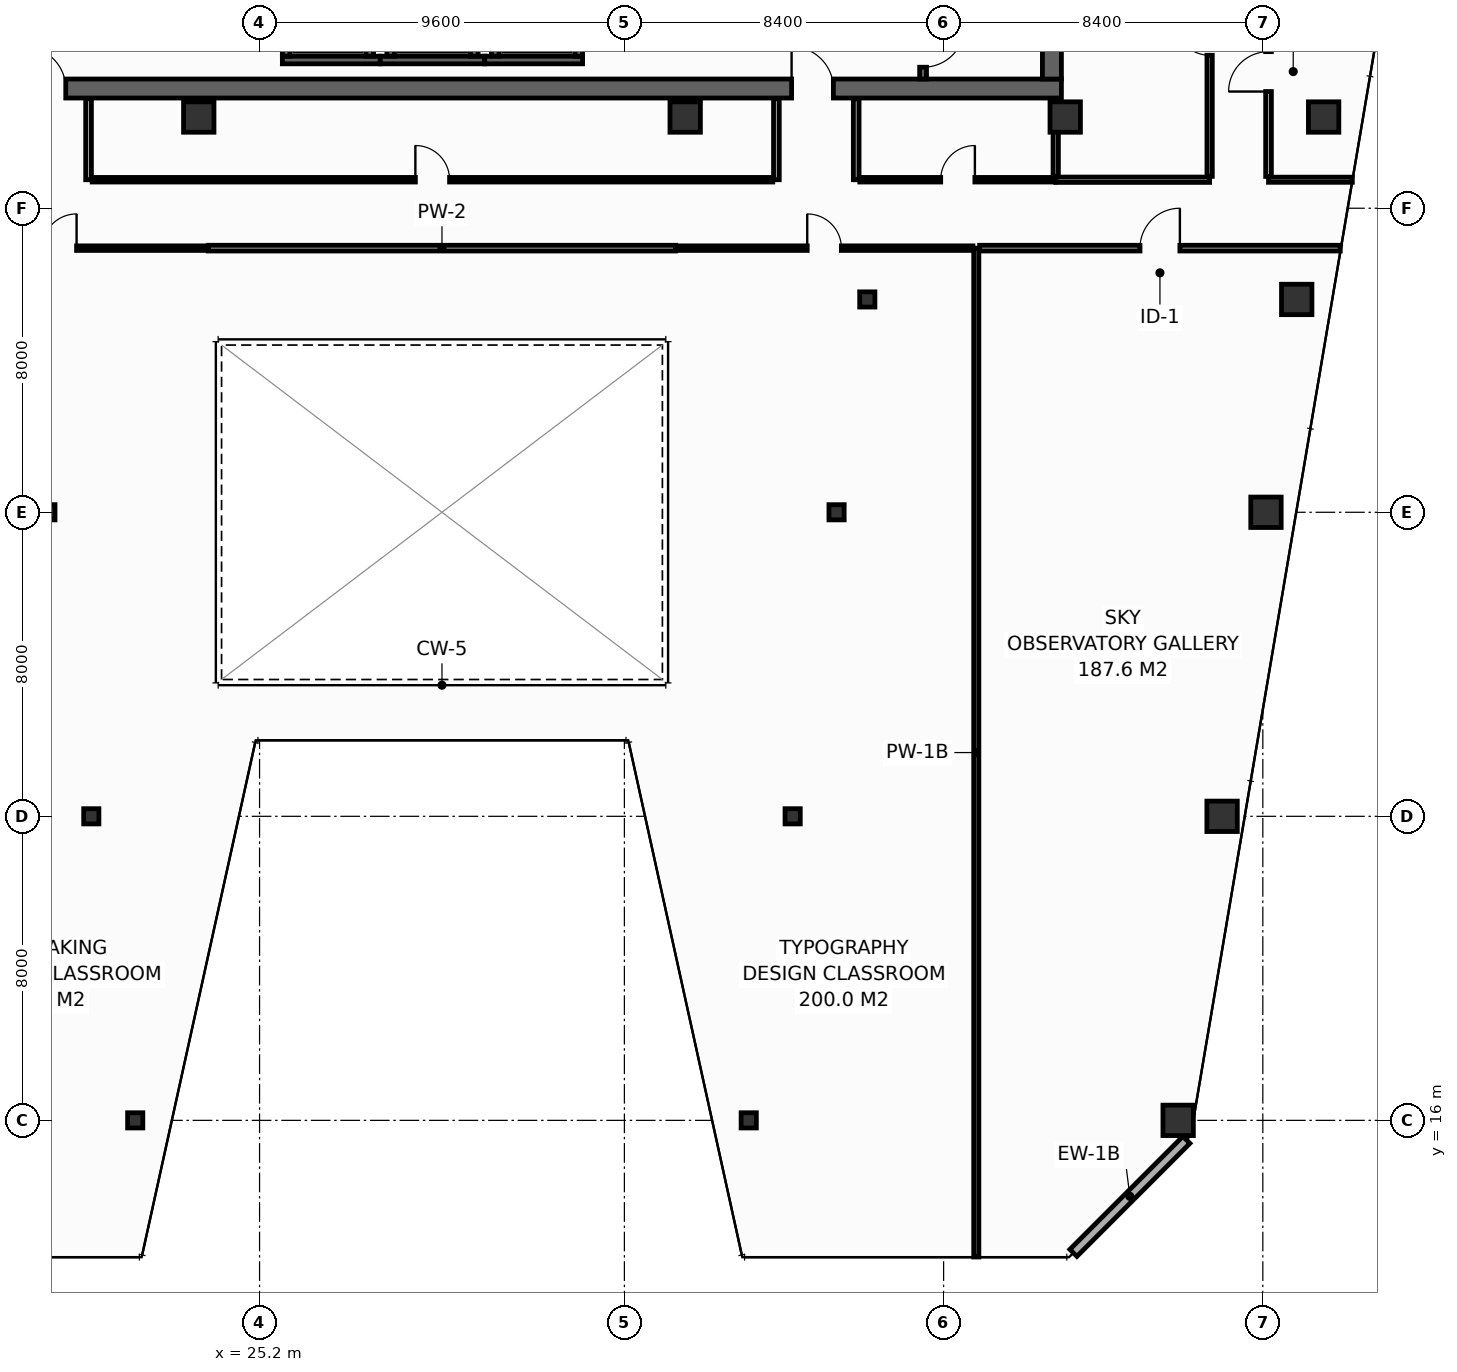
"""IFC4 building model, lengths in metres.
Left out: names, types, materials, properties, quantities, classifications, styles, units other than length and angle.
Written with IfcOpenShell. Run it as: python <this file> out.ifc"""

import sys

from ifc_helpers import new_model, si_unit, direction, frame, frame_2d, origin, origin_2d, place, context, subcontext, project, spatial, rectangle, hollow_rectangle, extrude, element, fill, save


model = new_model("IFC4")
c1 = context("Model", 3, precision=1e-05, world=origin(), true_north=direction((0.0, 1.0)))
c2 = subcontext(c1, "Body", "Model", "MODEL_VIEW")
j1 = project(units=[si_unit("LENGTHUNIT", "METRE"), si_unit("PLANEANGLEUNIT", "RADIAN")], contexts=[c1])
p1 = place(None, origin())
s1 = spatial("IfcSite", under=j1, at=p1, CompositionType="ELEMENT")
p2 = place(p1, origin())
s2 = spatial("IfcBuilding", under=s1, at=p2, CompositionType="ELEMENT")
p3 = place(p2, frame((0.0, 0.0, 217.0)))
s3 = spatial("IfcBuildingStorey", under=s2, at=p3, CompositionType="ELEMENT", Elevation=217.0)
p4 = place(p3, frame((13.6, 43.15, 0.0), z_axis=(0.0, 0.0, 1.0), x_axis=(1.0, 0.0, 0.0)))
e1 = element("IfcWall", 1, at=p4, inside=s3, PredefinedType="SHEAR", context=c2, shape_type="SweptSolid", body=[
    extrude(rectangle(XDim=32.7, YDim=0.5, at=frame_2d((16.35, 0.0))), origin(), (0.0, 0.0, 1.0), 3.55),
])
p5 = place(p4, frame((5.4, 0.0, 0.0)))
e2 = element("IfcOpeningElement", 2, at=p5, cuts=e1, PredefinedType="OPENING", context=c2, shape_type="SweptSolid", body=[
    extrude(rectangle(XDim=1.1, YDim=2.15, at=frame_2d((0.55, 1.075))), frame((0.0, 0.26, 0.0), z_axis=(0.0, -1.0, 0.0), x_axis=(1.0, 0.0, 0.0)), (0.0, 0.0, 1.0), 0.52),
])
p6 = place(p4, frame((25.6, 0.0, 0.0)))
e3 = element("IfcOpeningElement", 3, at=p6, cuts=e1, PredefinedType="OPENING", context=c2, shape_type="SweptSolid", body=[
    extrude(rectangle(XDim=1.1, YDim=2.15, at=frame_2d((0.55, 1.075))), frame((0.0, 0.26, 0.0), z_axis=(0.0, -1.0, 0.0), x_axis=(1.0, 0.0, 0.0)), (0.0, 0.0, 1.0), 0.52),
])
p7 = place(p3, frame((46.05, 43.4, 0.0), z_axis=(0.0, 0.0, 1.0), x_axis=(0.0, 1.0, 0.0)))
e4 = element("IfcWall", 4, at=p7, inside=s3, PredefinedType="SHEAR", context=c2, shape_type="SweptSolid", body=[
    extrude(rectangle(XDim=10.4, YDim=0.5, at=frame_2d((5.2, 0.0))), origin(), (0.0, 0.0, 1.0), 3.55),
])
for number, where, z_axis, x_axis in (
    (5, (23.6, 42.4, 0.0), (0.0, 0.0, 1.0), (1.0, 0.0, 0.0)),
    (6, (36.4, 42.4, 0.0), (0.0, 0.0, 1.0), (1.0, 0.0, 0.0)),
    (7, (46.4, 42.4, 0.0), (0.0, 0.0, 1.0), (1.0, 0.0, 0.0)),
    (8, (53.2, 42.4, 0.0), (0.0, 0.0, 1.0), (1.0, 0.0, 0.0)),
    (9, (49.372, 16.0, 0.0), (0.0, 0.0, 1.0), (1.0, 0.0, 0.0)),
):
    element("IfcColumn", number, at=place(p3, frame(where, z_axis=z_axis, x_axis=x_axis)), inside=s3, PredefinedType="COLUMN", context=c2, shape_type="SweptSolid", body=[
        extrude(hollow_rectangle(XDim=0.8, YDim=0.8, WallThickness=0.036, at=origin_2d()), origin(), (0.0, 0.0, 1.0), 3.8),
    ])
for number, where, z_axis, x_axis in (
    (10, (21.928, 16.0, 0.0), (0.0, 0.0, 1.0), (1.0, 0.0, 0.0)),
    (11, (38.072, 16.0, 0.0), (0.0, 0.0, 1.0), (1.0, 0.0, 0.0)),
):
    element("IfcColumn", number, at=place(p3, frame(where, z_axis=z_axis, x_axis=x_axis)), inside=s3, PredefinedType="COLUMN", context=c2, shape_type="SweptSolid", body=[
        extrude(hollow_rectangle(XDim=0.4, YDim=0.4, WallThickness=0.016, at=origin_2d()), origin(), (0.0, 0.0, 1.0), 3.8),
    ])
p8 = place(p3, frame((50.528, 24.0, 0.0), z_axis=(0.0, 0.0, 1.0), x_axis=(1.0, 0.0, 0.0)))
e12 = element("IfcColumn", 12, at=p8, inside=s3, PredefinedType="COLUMN", context=c2, shape_type="SweptSolid", body=[
    extrude(hollow_rectangle(XDim=0.8, YDim=0.8, WallThickness=0.036, at=origin_2d()), origin(), (0.0, 0.0, 1.0), 3.8),
])
for number, where, z_axis, x_axis in (
    (13, (20.772, 24.0, 0.0), (0.0, 0.0, 1.0), (1.0, 0.0, 0.0)),
    (14, (39.228, 24.0, 0.0), (0.0, 0.0, 1.0), (1.0, 0.0, 0.0)),
):
    element("IfcColumn", number, at=place(p3, frame(where, z_axis=z_axis, x_axis=x_axis)), inside=s3, PredefinedType="COLUMN", context=c2, shape_type="SweptSolid", body=[
        extrude(hollow_rectangle(XDim=0.4, YDim=0.4, WallThickness=0.016, at=origin_2d()), origin(), (0.0, 0.0, 1.0), 3.8),
    ])
p9 = place(p3, frame((51.683, 32.0, 0.0), z_axis=(0.0, 0.0, 1.0), x_axis=(1.0, 0.0, 0.0)))
e15 = element("IfcColumn", 15, at=p9, inside=s3, PredefinedType="COLUMN", context=c2, shape_type="SweptSolid", body=[
    extrude(hollow_rectangle(XDim=0.8, YDim=0.8, WallThickness=0.036, at=origin_2d()), origin(), (0.0, 0.0, 1.0), 3.8),
])
for number, where, z_axis, x_axis in (
    (16, (19.617, 32.0, 0.0), (0.0, 0.0, 1.0), (1.0, 0.0, 0.0)),
    (17, (40.383, 32.0, 0.0), (0.0, 0.0, 1.0), (1.0, 0.0, 0.0)),
):
    element("IfcColumn", number, at=place(p3, frame(where, z_axis=z_axis, x_axis=x_axis)), inside=s3, PredefinedType="COLUMN", context=c2, shape_type="SweptSolid", body=[
        extrude(hollow_rectangle(XDim=0.4, YDim=0.4, WallThickness=0.016, at=origin_2d()), origin(), (0.0, 0.0, 1.0), 3.8),
    ])
p10 = place(p3, frame((52.492, 37.6, 0.0), z_axis=(0.0, 0.0, 1.0), x_axis=(1.0, 0.0, 0.0)))
e18 = element("IfcColumn", 18, at=p10, inside=s3, PredefinedType="COLUMN", context=c2, shape_type="SweptSolid", body=[
    extrude(hollow_rectangle(XDim=0.8, YDim=0.8, WallThickness=0.036, at=origin_2d()), origin(), (0.0, 0.0, 1.0), 3.8),
])
p11 = place(p3, frame((41.192, 37.6, 0.0), z_axis=(0.0, 0.0, 1.0), x_axis=(1.0, 0.0, 0.0)))
e19 = element("IfcColumn", 19, at=p11, inside=s3, PredefinedType="COLUMN", context=c2, shape_type="SweptSolid", body=[
    extrude(hollow_rectangle(XDim=0.4, YDim=0.4, WallThickness=0.016, at=origin_2d()), origin(), (0.0, 0.0, 1.0), 3.8),
])
p12 = place(p3, frame((25.8, 43.9, 0.0), z_axis=(0.0, 0.0, 1.0), x_axis=(1.0, 0.0, 0.0)))
e20 = element("IfcWall", 20, at=p12, inside=s3, PredefinedType="SHEAR", context=c2, shape_type="SweptSolid", body=[
    extrude(rectangle(XDim=2.575, YDim=0.2, at=frame_2d((1.288, 0.0))), origin(), (0.0, 0.0, 1.0), 3.55),
])
for number, where, z_axis, x_axis in (
    (21, (25.9, 44.0, 0.0), (0.0, 0.0, 1.0), (0.0, 1.0, 0.0)),
    (22, (28.1, 44.0, 0.0), (0.0, 0.0, 1.0), (0.0, 1.0, 0.0)),
):
    element("IfcWall", number, at=place(p3, frame(where, z_axis=z_axis, x_axis=x_axis)), inside=s3, PredefinedType="SHEAR", context=c2, shape_type="SweptSolid", body=[
        extrude(rectangle(XDim=2.3, YDim=0.2, at=frame_2d((1.15, 0.0))), origin(), (0.0, 0.0, 1.0), 3.55),
    ])
p13 = place(p3, frame((28.375, 43.9, 0.0), z_axis=(0.0, 0.0, 1.0), x_axis=(1.0, 0.0, 0.0)))
e23 = element("IfcWall", 23, at=p13, inside=s3, PredefinedType="SHEAR", context=c2, shape_type="SweptSolid", body=[
    extrude(rectangle(XDim=2.75, YDim=0.2, at=frame_2d((1.375, 0.0))), origin(), (0.0, 0.0, 1.0), 3.55),
])
for number, where, z_axis, x_axis in (
    (24, (28.65, 44.0, 0.0), (0.0, 0.0, 1.0), (0.0, 1.0, 0.0)),
    (25, (30.85, 44.0, 0.0), (0.0, 0.0, 1.0), (0.0, 1.0, 0.0)),
):
    element("IfcWall", number, at=place(p3, frame(where, z_axis=z_axis, x_axis=x_axis)), inside=s3, PredefinedType="SHEAR", context=c2, shape_type="SweptSolid", body=[
        extrude(rectangle(XDim=2.3, YDim=0.2, at=frame_2d((1.15, 0.0))), origin(), (0.0, 0.0, 1.0), 3.55),
    ])
p14 = place(p3, frame((31.125, 43.9, 0.0), z_axis=(0.0, 0.0, 1.0), x_axis=(1.0, 0.0, 0.0)))
e26 = element("IfcWall", 26, at=p14, inside=s3, PredefinedType="SHEAR", context=c2, shape_type="SweptSolid", body=[
    extrude(rectangle(XDim=2.575, YDim=0.2, at=frame_2d((1.288, 0.0))), origin(), (0.0, 0.0, 1.0), 3.55),
])
for number, where, z_axis, x_axis in (
    (27, (31.4, 44.0, 0.0), (0.0, 0.0, 1.0), (0.0, 1.0, 0.0)),
    (28, (33.6, 44.0, 0.0), (0.0, 0.0, 1.0), (0.0, 1.0, 0.0)),
):
    element("IfcWall", number, at=place(p3, frame(where, z_axis=z_axis, x_axis=x_axis)), inside=s3, PredefinedType="SHEAR", context=c2, shape_type="SweptSolid", body=[
        extrude(rectangle(XDim=2.3, YDim=0.2, at=frame_2d((1.15, 0.0))), origin(), (0.0, 0.0, 1.0), 3.55),
    ])
p15 = place(p3, frame((42.66, 53.8, 0.0), z_axis=(0.0, 0.0, 1.0), x_axis=(0.0, -1.0, 0.0)))
e29 = element("IfcWall", 29, at=p15, inside=s3, PredefinedType="SHEAR", context=c2, shape_type="SweptSolid", body=[
    extrude(rectangle(XDim=10.4, YDim=0.18, at=frame_2d((5.2, 0.0))), origin(), (0.0, 0.0, 1.0), 3.55),
])
p16 = place(p15, frame((8.99, 0.0, 0.0)))
e30 = element("IfcOpeningElement", 30, at=p16, cuts=e29, PredefinedType="OPENING", context=c2, shape_type="SweptSolid", body=[
    extrude(rectangle(XDim=1.1, YDim=2.15, at=frame_2d((0.55, 1.075))), frame((0.0, 0.1, 0.0), z_axis=(0.0, -1.0, 0.0), x_axis=(1.0, 0.0, 0.0)), (0.0, 0.0, 1.0), 0.2),
])
p17 = place(p3, frame((46.615, 12.513, 0.0), z_axis=(0.0, 0.0, 1.0), x_axis=(0.707135806771, 0.70707775441, 0.0)))
e31 = element("IfcWall", 31, at=p17, inside=s3, PredefinedType="STANDARD", context=c2, shape_type="SweptSolid", body=[
    extrude(rectangle(XDim=4.206, YDim=0.26, at=frame_2d((2.103, 0.0))), origin(), (0.0, 0.0, 1.0), 3.55),
])
p18 = place(p3, frame((46.15, 40.75, 0.0), z_axis=(0.0, 0.0, 1.0), x_axis=(1.0, 0.0, 0.0)))
e32 = element("IfcWall", 32, at=p18, inside=s3, PredefinedType="PARTITIONING", context=c2, shape_type="SweptSolid", body=[
    extrude(rectangle(XDim=4.05, YDim=0.14, at=frame_2d((2.025, 0.0))), origin(), (0.0, 0.0, 1.0), 3.55),
])
p19 = place(p3, frame((46.15, 40.84, 0.0), z_axis=(0.0, 0.0, 1.0), x_axis=(0.0, 1.0, 0.0)))
e33 = element("IfcWall", 33, at=p19, inside=s3, PredefinedType="PARTITIONING", context=c2, shape_type="SweptSolid", body=[
    extrude(rectangle(XDim=2.04, YDim=0.14, at=frame_2d((1.02, 0.0))), origin(), (0.0, 0.0, 1.0), 3.55),
])
p20 = place(p3, frame((50.2, 40.84, 0.0), z_axis=(0.0, 0.0, 1.0), x_axis=(0.0, 1.0, 0.0)))
e34 = element("IfcWall", 34, at=p20, inside=s3, PredefinedType="PARTITIONING", context=c2, shape_type="SweptSolid", body=[
    extrude(rectangle(XDim=7.27, YDim=0.14, at=frame_2d((3.635, 0.0))), origin(), (0.0, 0.0, 1.0), 2.835),
])
p21 = place(p20, frame((3.185, 0.0, 0.0)))
e35 = element("IfcOpeningElement", 35, at=p21, cuts=e34, PredefinedType="OPENING", context=c2, shape_type="SweptSolid", body=[
    extrude(rectangle(XDim=0.9, YDim=2.1, at=frame_2d((0.45, 1.05))), frame((0.0, 0.08, 0.0), z_axis=(0.0, -1.0, 0.0), x_axis=(1.0, 0.0, 0.0)), (0.0, 0.0, 1.0), 0.16),
])
p22 = place(p3, frame((51.75, 40.75, 0.0), z_axis=(0.0, 0.0, 1.0), x_axis=(1.0, 0.0, 0.0)))
e36 = element("IfcWall", 36, at=p22, inside=s3, PredefinedType="PARTITIONING", context=c2, shape_type="SweptSolid", body=[
    extrude(rectangle(XDim=2.205, YDim=0.135, at=frame_2d((1.103, 0.0))), origin(), (0.0, 0.0, 1.0), 3.035),
])
p23 = place(p3, frame((51.75, 40.837, 0.0), z_axis=(0.0, 0.0, 1.0), x_axis=(0.0, 1.0, 0.0)))
e37 = element("IfcWall", 37, at=p23, inside=s3, PredefinedType="PARTITIONING", context=c2, shape_type="SweptSolid", body=[
    extrude(rectangle(XDim=5.075, YDim=0.15, at=frame_2d((2.538, 0.0))), origin(), (0.0, 0.0, 1.0), 2.835),
])
p24 = place(p23, frame((2.233, 0.0, 0.0)))
e38 = element("IfcOpeningElement", 38, at=p24, cuts=e37, PredefinedType="OPENING", context=c2, shape_type="SweptSolid", body=[
    extrude(rectangle(XDim=1.05, YDim=2.15, at=frame_2d((0.525, 1.075))), frame((0.0, 0.085, 0.0), z_axis=(0.0, -1.0, 0.0), x_axis=(1.0, 0.0, 0.0)), (0.0, 0.0, 1.0), 0.17),
])
for number, where, z_axis, x_axis in (
    (39, (20.7, 40.75, 0.0), (0.0, 0.0, 1.0), (0.0, 1.0, 0.0)),
    (40, (38.8, 40.75, 0.0), (0.0, 0.0, 1.0), (0.0, 1.0, 0.0)),
    (41, (40.9, 40.75, 0.0), (0.0, 0.0, 1.0), (0.0, 1.0, 0.0)),
):
    element("IfcWall", number, at=place(p3, frame(where, z_axis=z_axis, x_axis=x_axis)), inside=s3, PredefinedType="PARTITIONING", context=c2, shape_type="SweptSolid", body=[
        extrude(rectangle(XDim=2.13, YDim=0.15, at=frame_2d((1.065, 0.0))), origin(), (0.0, 0.0, 1.0), 3.55),
    ])
p25 = place(p3, frame((20.795, 40.75, 0.0), z_axis=(0.0, 0.0, 1.0), x_axis=(1.0, 0.0, 0.0)))
e42 = element("IfcWall", 42, at=p25, inside=s3, PredefinedType="PARTITIONING", context=c2, shape_type="SweptSolid", body=[
    extrude(rectangle(XDim=17.91, YDim=0.12, at=frame_2d((8.955, 0.0))), origin(), (0.0, 0.0, 1.0), 2.835),
])
p26 = place(p25, frame((8.505, 0.0, 0.0)))
e43 = element("IfcOpeningElement", 43, at=p26, cuts=e42, PredefinedType="OPENING", context=c2, shape_type="SweptSolid", body=[
    extrude(rectangle(XDim=0.9, YDim=2.1, at=frame_2d((0.45, 1.05))), frame((0.0, 0.07, 0.0), z_axis=(0.0, -1.0, 0.0), x_axis=(1.0, 0.0, 0.0)), (0.0, 0.0, 1.0), 0.14),
])
p27 = place(p3, frame((40.995, 40.75, 0.0), z_axis=(0.0, 0.0, 1.0), x_axis=(1.0, 0.0, 0.0)))
e44 = element("IfcWall", 44, at=p27, inside=s3, PredefinedType="PARTITIONING", context=c2, shape_type="SweptSolid", body=[
    extrude(rectangle(XDim=5.155, YDim=0.12, at=frame_2d((2.577, 0.0))), origin(), (0.0, 0.0, 1.0), 3.55),
])
p28 = place(p27, frame((2.128, 0.0, 0.0)))
e45 = element("IfcOpeningElement", 45, at=p28, cuts=e44, PredefinedType="OPENING", context=c2, shape_type="SweptSolid", body=[
    extrude(rectangle(XDim=0.9, YDim=2.1, at=frame_2d((0.45, 1.05))), frame((0.0, 0.07, 0.0), z_axis=(0.0, -1.0, 0.0), x_axis=(1.0, 0.0, 0.0)), (0.0, 0.0, 1.0), 0.14),
])
p29 = place(p3, frame((44.06, 12.405, 0.0), z_axis=(0.0, 0.0, 1.0), x_axis=(0.0, 1.0, 0.0)))
e46 = element("IfcWall", 46, at=p29, inside=s3, PredefinedType="PARTITIONING", context=c2, shape_type="SweptSolid", body=[
    extrude(rectangle(XDim=26.545, YDim=0.135, at=frame_2d((13.272, 0.0))), origin(), (0.0, 0.0, 1.0), 2.835),
])
p30 = place(p3, frame((16.02, 38.95, 0.0), z_axis=(0.0, 0.0, 1.0), x_axis=(1.0, 0.0, 0.0)))
e47 = element("IfcWall", 47, at=p30, inside=s3, PredefinedType="PARTITIONING", context=c2, shape_type="SweptSolid", body=[
    extrude(rectangle(XDim=7.83, YDim=0.12, at=frame_2d((3.915, 0.0))), origin(), (0.0, 0.0, 1.0), 2.835),
])
p31 = place(p30, frame((3.465, 0.0, 0.0)))
e48 = element("IfcOpeningElement", 48, at=p31, cuts=e47, PredefinedType="OPENING", context=c2, shape_type="SweptSolid", body=[
    extrude(rectangle(XDim=0.9, YDim=2.1, at=frame_2d((0.45, 1.05))), frame((0.0, 0.07, 0.0), z_axis=(0.0, -1.0, 0.0), x_axis=(1.0, 0.0, 0.0)), (0.0, 0.0, 1.0), 0.14),
])
p32 = place(p3, frame((23.85, 38.95, 0.0), z_axis=(0.0, 0.0, 1.0), x_axis=(1.0, 0.0, 0.0)))
e49 = element("IfcWall", 49, at=p32, inside=s3, PredefinedType="PARTITIONING", context=c2, shape_type="SweptSolid", body=[
    extrude(rectangle(XDim=12.3, YDim=0.15, at=frame_2d((6.15, 0.0))), origin(), (0.0, 0.0, 1.0), 3.55),
])
p33 = place(p3, frame((36.15, 38.95, 0.0), z_axis=(0.0, 0.0, 1.0), x_axis=(1.0, 0.0, 0.0)))
e50 = element("IfcWall", 50, at=p33, inside=s3, PredefinedType="PARTITIONING", context=c2, shape_type="SweptSolid", body=[
    extrude(rectangle(XDim=7.823, YDim=0.12, at=frame_2d((3.911, 0.0))), origin(), (0.0, 0.0, 1.0), 2.835),
])
p34 = place(p33, frame((3.461, 0.0, 0.0)))
e51 = element("IfcOpeningElement", 51, at=p34, cuts=e50, PredefinedType="OPENING", context=c2, shape_type="SweptSolid", body=[
    extrude(rectangle(XDim=0.9, YDim=2.1, at=frame_2d((0.45, 1.05))), frame((0.0, 0.07, 0.0), z_axis=(0.0, -1.0, 0.0), x_axis=(1.0, 0.0, 0.0)), (0.0, 0.0, 1.0), 0.14),
])
p35 = place(p3, frame((44.147, 38.95, 0.0), z_axis=(0.0, 0.0, 1.0), x_axis=(1.0, 0.0, 0.0)))
e52 = element("IfcWall", 52, at=p35, inside=s3, PredefinedType="PARTITIONING", context=c2, shape_type="SweptSolid", body=[
    extrude(rectangle(XDim=9.49, YDim=0.15, at=frame_2d((4.745, 0.0))), origin(), (0.0, 0.0, 1.0), 3.035),
])
p36 = place(p35, frame((4.22, 0.0, 0.0)))
e53 = element("IfcOpeningElement", 53, at=p36, cuts=e52, PredefinedType="OPENING", context=c2, shape_type="SweptSolid", body=[
    extrude(rectangle(XDim=1.05, YDim=2.15, at=frame_2d((0.525, 1.075))), frame((0.0, 0.085, 0.0), z_axis=(0.0, -1.0, 0.0), x_axis=(1.0, 0.0, 0.0)), (0.0, 0.0, 1.0), 0.17),
])
p37 = place(p16, origin())
e54 = element("IfcDoor", 54, at=p37, inside=s3, OperationType="SINGLE_SWING_LEFT", PredefinedType="DOOR", context=c2, shape_type="SweptSolid", body=[
    extrude(rectangle(XDim=1.1, YDim=2.15, at=frame_2d((0.55, 1.075))), frame((0.0, 0.025, 0.0), z_axis=(0.0, -1.0, 0.0), x_axis=(1.0, 0.0, 0.0)), (0.0, 0.0, 1.0), 0.05),
])
fill(e30, e54)
p38 = place(p5, origin())
e55 = element("IfcDoor", 55, at=p38, inside=s3, OperationType="SINGLE_SWING_LEFT", PredefinedType="DOOR", context=c2, shape_type="SweptSolid", body=[
    extrude(rectangle(XDim=1.1, YDim=2.15, at=frame_2d((0.55, 1.075))), frame((0.0, 0.025, 0.0), z_axis=(0.0, -1.0, 0.0), x_axis=(1.0, 0.0, 0.0)), (0.0, 0.0, 1.0), 0.05),
])
fill(e2, e55)
p39 = place(p6, origin())
e56 = element("IfcDoor", 56, at=p39, inside=s3, OperationType="SINGLE_SWING_LEFT", PredefinedType="DOOR", context=c2, shape_type="SweptSolid", body=[
    extrude(rectangle(XDim=1.1, YDim=2.15, at=frame_2d((0.55, 1.075))), frame((0.0, 0.025, 0.0), z_axis=(0.0, -1.0, 0.0), x_axis=(1.0, 0.0, 0.0)), (0.0, 0.0, 1.0), 0.05),
])
fill(e3, e56)
p40 = place(p21, origin())
e57 = element("IfcDoor", 57, at=p40, inside=s3, OperationType="SINGLE_SWING_RIGHT", PredefinedType="DOOR", context=c2, shape_type="SweptSolid", body=[
    extrude(rectangle(XDim=0.9, YDim=2.1, at=frame_2d((0.45, 1.05))), frame((0.0, 0.025, 0.0), z_axis=(0.0, -1.0, 0.0), x_axis=(1.0, 0.0, 0.0)), (0.0, 0.0, 1.0), 0.05),
])
fill(e35, e57)
p41 = place(p24, origin())
e58 = element("IfcDoor", 58, at=p41, inside=s3, OperationType="SINGLE_SWING_LEFT", PredefinedType="DOOR", context=c2, shape_type="SweptSolid", body=[
    extrude(rectangle(XDim=1.05, YDim=2.15, at=frame_2d((0.525, 1.075))), frame((0.0, 0.025, 0.0), z_axis=(0.0, -1.0, 0.0), x_axis=(1.0, 0.0, 0.0)), (0.0, 0.0, 1.0), 0.05),
])
fill(e38, e58)
p42 = place(p26, origin())
e59 = element("IfcDoor", 59, at=p42, inside=s3, OperationType="SINGLE_SWING_LEFT", PredefinedType="DOOR", context=c2, shape_type="SweptSolid", body=[
    extrude(rectangle(XDim=0.9, YDim=2.1, at=frame_2d((0.45, 1.05))), frame((0.0, 0.025, 0.0), z_axis=(0.0, -1.0, 0.0), x_axis=(1.0, 0.0, 0.0)), (0.0, 0.0, 1.0), 0.05),
])
fill(e43, e59)
p43 = place(p28, origin())
e60 = element("IfcDoor", 60, at=p43, inside=s3, OperationType="SINGLE_SWING_RIGHT", PredefinedType="DOOR", context=c2, shape_type="SweptSolid", body=[
    extrude(rectangle(XDim=0.9, YDim=2.1, at=frame_2d((0.45, 1.05))), frame((0.0, 0.025, 0.0), z_axis=(0.0, -1.0, 0.0), x_axis=(1.0, 0.0, 0.0)), (0.0, 0.0, 1.0), 0.05),
])
fill(e45, e60)
p44 = place(p31, origin())
e61 = element("IfcDoor", 61, at=p44, inside=s3, OperationType="SINGLE_SWING_RIGHT", PredefinedType="DOOR", context=c2, shape_type="SweptSolid", body=[
    extrude(rectangle(XDim=0.9, YDim=2.1, at=frame_2d((0.45, 1.05))), frame((0.0, 0.025, 0.0), z_axis=(0.0, -1.0, 0.0), x_axis=(1.0, 0.0, 0.0)), (0.0, 0.0, 1.0), 0.05),
])
fill(e48, e61)
p45 = place(p34, origin())
e62 = element("IfcDoor", 62, at=p45, inside=s3, OperationType="SINGLE_SWING_LEFT", PredefinedType="DOOR", context=c2, shape_type="SweptSolid", body=[
    extrude(rectangle(XDim=0.9, YDim=2.1, at=frame_2d((0.45, 1.05))), frame((0.0, 0.025, 0.0), z_axis=(0.0, -1.0, 0.0), x_axis=(1.0, 0.0, 0.0)), (0.0, 0.0, 1.0), 0.05),
])
fill(e51, e62)
p46 = place(p36, origin())
e63 = element("IfcDoor", 63, at=p46, inside=s3, OperationType="SINGLE_SWING_RIGHT", PredefinedType="DOOR", context=c2, shape_type="SweptSolid", body=[
    extrude(rectangle(XDim=1.05, YDim=2.15, at=frame_2d((0.525, 1.075))), frame((0.0, 0.025, 0.0), z_axis=(0.0, -1.0, 0.0), x_axis=(1.0, 0.0, 0.0)), (0.0, 0.0, 1.0), 0.05),
])
fill(e53, e63)
save(model, sys.argv[1])
